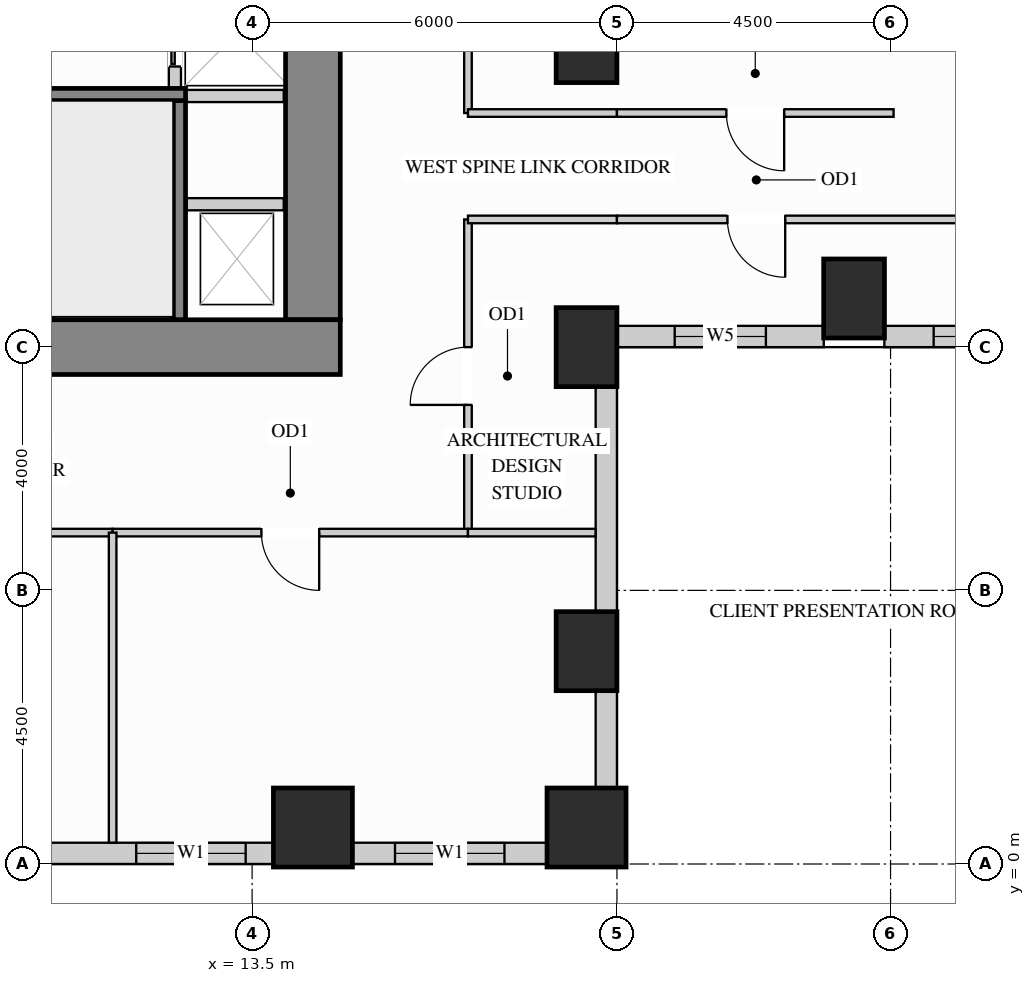
"""IFC4 building model, lengths in metres.
Left out: names, types, materials, properties, quantities, classifications, styles, units other than length and angle.
Written with IfcOpenShell. Run it as: python <this file> out.ifc"""

import sys

from ifc_helpers import new_model, si_unit, direction, frame, frame_2d, origin, origin_2d, place, context, subcontext, project, spatial, rectangle, extrude, source, transform, mapped, element, fill, save


model = new_model("IFC4")
c1 = context("Model", 3, precision=1e-05, world=origin(), true_north=direction((0.0, 1.0)))
c2 = subcontext(c1, "Body", "Model", "MODEL_VIEW")
j1 = project(units=[si_unit("LENGTHUNIT", "METRE"), si_unit("PLANEANGLEUNIT", "RADIAN")], contexts=[c1])
p1 = place(None, origin())
s1 = spatial("IfcSite", under=j1, at=p1, CompositionType="ELEMENT")
p2 = place(p1, origin())
s2 = spatial("IfcBuilding", under=s1, at=p2, CompositionType="ELEMENT")
p3 = place(p2, frame((0.0, 0.0, 26.1)))
s3 = spatial("IfcBuildingStorey", under=s2, at=p3, CompositionType="ELEMENT", Elevation=26.1)
m1 = source(origin(), c2, "Body", "SweptSolid", [
    extrude(rectangle(XDim=1.0, YDim=1.3, at=origin_2d()), origin(), (0.0, 0.0, 1.0), 3.38),
])
for number, where, z_axis, x_axis in (
    (1, (19.0, 13.5, 0.0), (0.0, 0.0, 1.0), (1.0, 0.0, 0.0)),
    (2, (19.0, 3.5, 0.0), (0.0, 0.0, 1.0), (1.0, 0.0, 0.0)),
    (3, (19.0, 8.5, 0.0), (0.0, 0.0, 1.0), (1.0, 0.0, 0.0)),
    (4, (23.4, 9.3, 0.0), (0.0, 0.0, 1.0), (1.0, 0.0, 0.0)),
):
    element("IfcColumn", number, at=place(p3, frame(where, z_axis=z_axis, x_axis=x_axis)), inside=s3, PredefinedType="COLUMN", context=c2, shape_type="MappedRepresentation", body=[
        mapped(m1, transform((0.0, 0.0, 0.0), x_axis=(1.0, 0.0, 0.0), y_axis=(0.0, 1.0, 0.0), z_axis=(0.0, 0.0, 1.0))),
    ])
m2 = source(origin(), c2, "Body", "SweptSolid", [
    extrude(rectangle(XDim=1.3, YDim=1.3, at=origin_2d()), origin(), (0.0, 0.0, 1.0), 3.38),
])
for number, where, z_axis, x_axis in (
    (5, (14.5, 0.6, 0.0), (0.0, 0.0, 1.0), (1.0, 0.0, 0.0)),
    (6, (19.0, 0.6, 0.0), (0.0, 0.0, 1.0), (1.0, 0.0, 0.0)),
):
    element("IfcColumn", number, at=place(p3, frame(where, z_axis=z_axis, x_axis=x_axis)), inside=s3, PredefinedType="COLUMN", context=c2, shape_type="MappedRepresentation", body=[
        mapped(m2, transform((0.0, 0.0, 0.0), x_axis=(1.0, 0.0, 0.0), y_axis=(0.0, 1.0, 0.0), z_axis=(0.0, 0.0, 1.0))),
    ])
m3 = source(origin(), c2, "Body", "SweptSolid", [
    extrude(rectangle(XDim=9.87, YDim=0.9, at=frame_2d((4.935, 0.0))), origin(), (0.0, 0.0, 1.0), 3.38),
])
p4 = place(p3, frame((14.5, 8.95, 0.0), z_axis=(0.0, 0.0, 1.0), x_axis=(0.0, 1.0, 0.0)))
e7 = element("IfcWall", 7, at=p4, inside=s3, PredefinedType="SHEAR", context=c2, shape_type="MappedRepresentation", body=[
    mapped(m3, transform((0.0, 0.0, 0.0), x_axis=(1.0, 0.0, 0.0), y_axis=(0.0, 1.0, 0.0), z_axis=(0.0, 0.0, 1.0))),
])
m4 = source(origin(), c2, "Body", "SweptSolid", [
    extrude(rectangle(XDim=10.9, YDim=0.9, at=frame_2d((5.45, 0.0))), origin(), (0.0, 0.0, 1.0), 3.38),
])
p5 = place(p3, frame((4.05, 8.5, 0.0), z_axis=(0.0, 0.0, 1.0), x_axis=(1.0, 0.0, 0.0)))
e8 = element("IfcWall", 8, at=p5, inside=s3, PredefinedType="SHEAR", context=c2, shape_type="MappedRepresentation", body=[
    mapped(m4, transform((0.0, 0.0, 0.0), x_axis=(1.0, 0.0, 0.0), y_axis=(0.0, 1.0, 0.0), z_axis=(0.0, 0.0, 1.0))),
])
p6 = place(p3, frame((9.648, 0.175, 0.0), z_axis=(0.0, 0.0, 1.0), x_axis=(1.0, 0.0, 0.0)))
e9 = element("IfcWall", 9, at=p6, inside=s3, PredefinedType="SOLIDWALL", context=c2, shape_type="SweptSolid", body=[
    extrude(rectangle(XDim=4.204, YDim=0.35, at=frame_2d((2.102, 0.0))), origin(), (0.0, 0.0, 1.0), 2.51),
])
p7 = place(p6, frame((1.946, 0.0, 0.78)))
e10 = element("IfcOpeningElement", 10, at=p7, cuts=e9, PredefinedType="OPENING", context=c2, shape_type="SweptSolid", body=[
    extrude(rectangle(XDim=1.8, YDim=1.55, at=frame_2d((0.9, 0.775))), frame((0.0, 0.185, 0.0), z_axis=(0.0, -1.0, 0.0), x_axis=(1.0, 0.0, 0.0)), (0.0, 0.0, 1.0), 0.37),
])
p8 = place(p3, frame((15.148, 0.175, 0.0), z_axis=(0.0, 0.0, 1.0), x_axis=(1.0, 0.0, 0.0)))
e11 = element("IfcWall", 11, at=p8, inside=s3, PredefinedType="SOLIDWALL", context=c2, shape_type="SweptSolid", body=[
    extrude(rectangle(XDim=3.204, YDim=0.35, at=frame_2d((1.602, 0.0))), origin(), (0.0, 0.0, 1.0), 2.51),
])
p9 = place(p8, frame((0.702, 0.0, 0.78)))
e12 = element("IfcOpeningElement", 12, at=p9, cuts=e11, PredefinedType="OPENING", context=c2, shape_type="SweptSolid", body=[
    extrude(rectangle(XDim=1.8, YDim=1.55, at=frame_2d((0.9, 0.775))), frame((0.0, 0.185, 0.0), z_axis=(0.0, -1.0, 0.0), x_axis=(1.0, 0.0, 0.0)), (0.0, 0.0, 1.0), 0.37),
])
m5 = source(origin(), c2, "Body", "SweptSolid", [
    extrude(rectangle(XDim=1.604, YDim=0.35, at=frame_2d((0.802, 0.0))), origin(), (0.0, 0.0, 1.0), 2.51),
])
p10 = place(p3, frame((19.325, 1.248, 0.0), z_axis=(0.0, 0.0, 1.0), x_axis=(0.0, 1.0, 0.0)))
e13 = element("IfcWall", 13, at=p10, inside=s3, PredefinedType="SOLIDWALL", context=c2, shape_type="MappedRepresentation", body=[
    mapped(m5, transform((0.0, 0.0, 0.0), x_axis=(1.0, 0.0, 0.0), y_axis=(0.0, 1.0, 0.0), z_axis=(0.0, 0.0, 1.0))),
])
m6 = source(origin(), c2, "Body", "SweptSolid", [
    extrude(rectangle(XDim=3.704, YDim=0.35, at=frame_2d((1.852, 0.0))), origin(), (0.0, 0.0, 1.0), 2.51),
])
p11 = place(p3, frame((19.325, 4.148, 0.0), z_axis=(0.0, 0.0, 1.0), x_axis=(0.0, 1.0, 0.0)))
e14 = element("IfcWall", 14, at=p11, inside=s3, PredefinedType="SOLIDWALL", context=c2, shape_type="MappedRepresentation", body=[
    mapped(m6, transform((0.0, 0.0, 0.0), x_axis=(1.0, 0.0, 0.0), y_axis=(0.0, 1.0, 0.0), z_axis=(0.0, 0.0, 1.0))),
])
p12 = place(p3, frame((19.498, 8.675, 0.0), z_axis=(0.0, 0.0, 1.0), x_axis=(1.0, 0.0, 0.0)))
e15 = element("IfcWall", 15, at=p12, inside=s3, PredefinedType="SOLIDWALL", context=c2, shape_type="SweptSolid", body=[
    extrude(rectangle(XDim=3.404, YDim=0.35, at=frame_2d((1.702, 0.0))), origin(), (0.0, 0.0, 1.0), 3.365),
])
p13 = place(p12, frame((0.952, 0.0, 0.78)))
e16 = element("IfcOpeningElement", 16, at=p13, cuts=e15, PredefinedType="OPENING", context=c2, shape_type="SweptSolid", body=[
    extrude(rectangle(XDim=1.5, YDim=2.0, at=frame_2d((0.75, 1.0))), frame((0.0, 0.185, 0.0), z_axis=(0.0, -1.0, 0.0), x_axis=(1.0, 0.0, 0.0)), (0.0, 0.0, 1.0), 0.37),
])
p14 = place(p3, frame((23.898, 8.675, 0.0), z_axis=(0.0, 0.0, 1.0), x_axis=(1.0, 0.0, 0.0)))
e17 = element("IfcWall", 17, at=p14, inside=s3, PredefinedType="SOLIDWALL", context=c2, shape_type="SweptSolid", body=[
    extrude(rectangle(XDim=6.104, YDim=0.35, at=frame_2d((3.052, 0.0))), origin(), (0.0, 0.0, 1.0), 3.365),
])
p15 = place(p14, frame((0.811, 0.0, 0.78)))
e18 = element("IfcOpeningElement", 18, at=p15, cuts=e17, PredefinedType="OPENING", context=c2, shape_type="SweptSolid", body=[
    extrude(rectangle(XDim=1.5, YDim=2.0, at=frame_2d((0.75, 1.0))), frame((0.0, 0.185, 0.0), z_axis=(0.0, -1.0, 0.0), x_axis=(1.0, 0.0, 0.0)), (0.0, 0.0, 1.0), 0.37),
])
p16 = place(p14, frame((3.793, 0.0, 0.78)))
e19 = element("IfcOpeningElement", 19, at=p16, cuts=e17, PredefinedType="OPENING", context=c2, shape_type="SweptSolid", body=[
    extrude(rectangle(XDim=1.5, YDim=2.0, at=frame_2d((0.75, 1.0))), frame((0.0, 0.185, 0.0), z_axis=(0.0, -1.0, 0.0), x_axis=(1.0, 0.0, 0.0)), (0.0, 0.0, 1.0), 0.37),
])
p17 = place(p3, frame((17.05, 12.35, 0.0), z_axis=(0.0, 0.0, 1.0), x_axis=(0.0, 1.0, 0.0)))
e20 = element("IfcWall", 20, at=p17, inside=s3, PredefinedType="PARTITIONING", context=c2, shape_type="SweptSolid", body=[
    extrude(rectangle(XDim=5.85, YDim=0.125, at=frame_2d((2.925, 0.0))), origin(), (0.0, 0.0, 1.0), 3.365),
])
p18 = place(p17, frame((2.45, 0.0, 0.0)))
e21 = element("IfcOpeningElement", 21, at=p18, cuts=e20, PredefinedType="OPENING", context=c2, shape_type="SweptSolid", body=[
    extrude(rectangle(XDim=0.95, YDim=2.15, at=frame_2d((0.475, 1.075))), frame((0.0, 0.073, 0.0), z_axis=(0.0, -1.0, 0.0), x_axis=(1.0, 0.0, 0.0)), (0.0, 0.0, 1.0), 0.145),
])
p19 = place(p3, frame((17.05, 5.45, 0.0), z_axis=(0.0, 0.0, 1.0), x_axis=(0.0, 1.0, 0.0)))
e22 = element("IfcWall", 22, at=p19, inside=s3, PredefinedType="PARTITIONING", context=c2, shape_type="SweptSolid", body=[
    extrude(rectangle(XDim=5.15, YDim=0.125, at=frame_2d((2.575, 0.0))), origin(), (0.0, 0.0, 1.0), 3.365),
])
p20 = place(p19, frame((2.1, 0.0, 0.0)))
e23 = element("IfcOpeningElement", 23, at=p20, cuts=e22, PredefinedType="OPENING", context=c2, shape_type="SweptSolid", body=[
    extrude(rectangle(XDim=0.95, YDim=2.15, at=frame_2d((0.475, 1.075))), frame((0.0, 0.073, 0.0), z_axis=(0.0, -1.0, 0.0), x_axis=(1.0, 0.0, 0.0)), (0.0, 0.0, 1.0), 0.145),
])
m7 = source(origin(), c2, "Body", "SweptSolid", [
    extrude(rectangle(XDim=2.45, YDim=0.125, at=frame_2d((1.225, 0.0))), origin(), (0.0, 0.0, 1.0), 3.365),
])
p21 = place(p3, frame((17.05, 12.35, 0.0), z_axis=(0.0, 0.0, 1.0), x_axis=(1.0, 0.0, 0.0)))
e24 = element("IfcWall", 24, at=p21, inside=s3, PredefinedType="PARTITIONING", context=c2, shape_type="MappedRepresentation", body=[
    mapped(m7, transform((0.0, 0.0, 0.0), x_axis=(1.0, 0.0, 0.0), y_axis=(0.0, 1.0, 0.0), z_axis=(0.0, 0.0, 1.0))),
])
p22 = place(p3, frame((19.5, 12.35, 0.0), z_axis=(0.0, 0.0, 1.0), x_axis=(1.0, 0.0, 0.0)))
e25 = element("IfcWall", 25, at=p22, inside=s3, PredefinedType="PARTITIONING", context=c2, shape_type="SweptSolid", body=[
    extrude(rectangle(XDim=4.55, YDim=0.125, at=frame_2d((2.275, 0.0))), origin(), (0.0, 0.0, 1.0), 3.365),
])
p23 = place(p22, frame((1.8, 0.0, 0.0)))
e26 = element("IfcOpeningElement", 26, at=p23, cuts=e25, PredefinedType="OPENING", context=c2, shape_type="SweptSolid", body=[
    extrude(rectangle(XDim=0.95, YDim=2.15, at=frame_2d((0.475, 1.075))), frame((0.0, 0.073, 0.0), z_axis=(0.0, -1.0, 0.0), x_axis=(1.0, 0.0, 0.0)), (0.0, 0.0, 1.0), 0.145),
])
p24 = place(p3, frame((17.05, 10.6, 0.0), z_axis=(0.0, 0.0, 1.0), x_axis=(1.0, 0.0, 0.0)))
e27 = element("IfcWall", 27, at=p24, inside=s3, PredefinedType="PARTITIONING", context=c2, shape_type="MappedRepresentation", body=[
    mapped(m7, transform((0.0, 0.0, 0.0), x_axis=(1.0, 0.0, 0.0), y_axis=(0.0, 1.0, 0.0), z_axis=(0.0, 0.0, 1.0))),
])
p25 = place(p3, frame((19.5, 10.6, 0.0), z_axis=(0.0, 0.0, 1.0), x_axis=(1.0, 0.0, 0.0)))
e28 = element("IfcWall", 28, at=p25, inside=s3, PredefinedType="PARTITIONING", context=c2, shape_type="SweptSolid", body=[
    extrude(rectangle(XDim=7.45, YDim=0.125, at=frame_2d((3.725, 0.0))), origin(), (0.0, 0.0, 1.0), 3.365),
])
p26 = place(p25, frame((1.817, 0.0, 0.0)))
e29 = element("IfcOpeningElement", 29, at=p26, cuts=e28, PredefinedType="OPENING", context=c2, shape_type="SweptSolid", body=[
    extrude(rectangle(XDim=0.95, YDim=2.15, at=frame_2d((0.475, 1.075))), frame((0.0, 0.073, 0.0), z_axis=(0.0, -1.0, 0.0), x_axis=(1.0, 0.0, 0.0)), (0.0, 0.0, 1.0), 0.145),
])
p27 = place(p3, frame((2.45, 5.45, 0.0), z_axis=(0.0, 0.0, 1.0), x_axis=(1.0, 0.0, 0.0)))
e30 = element("IfcWall", 30, at=p27, inside=s3, PredefinedType="PARTITIONING", context=c2, shape_type="SweptSolid", body=[
    extrude(rectangle(XDim=8.756, YDim=0.125, at=frame_2d((4.378, 0.0))), origin(), (0.0, 0.0, 1.0), 3.365),
])
p28 = place(p27, frame((3.903, 0.0, 0.0)))
e31 = element("IfcOpeningElement", 31, at=p28, cuts=e30, PredefinedType="OPENING", context=c2, shape_type="SweptSolid", body=[
    extrude(rectangle(XDim=0.95, YDim=2.15, at=frame_2d((0.475, 1.075))), frame((0.0, 0.073, 0.0), z_axis=(0.0, -1.0, 0.0), x_axis=(1.0, 0.0, 0.0)), (0.0, 0.0, 1.0), 0.145),
])
p29 = place(p3, frame((11.206, 5.45, 0.0), z_axis=(0.0, 0.0, 1.0), x_axis=(1.0, 0.0, 0.0)))
e32 = element("IfcWall", 32, at=p29, inside=s3, PredefinedType="PARTITIONING", context=c2, shape_type="SweptSolid", body=[
    extrude(rectangle(XDim=5.844, YDim=0.125, at=frame_2d((2.922, 0.0))), origin(), (0.0, 0.0, 1.0), 3.365),
])
p30 = place(p29, frame((2.447, 0.0, 0.0)))
e33 = element("IfcOpeningElement", 33, at=p30, cuts=e32, PredefinedType="OPENING", context=c2, shape_type="SweptSolid", body=[
    extrude(rectangle(XDim=0.95, YDim=2.15, at=frame_2d((0.475, 1.075))), frame((0.0, 0.073, 0.0), z_axis=(0.0, -1.0, 0.0), x_axis=(1.0, 0.0, 0.0)), (0.0, 0.0, 1.0), 0.145),
])
m8 = source(origin(), c2, "Body", "SweptSolid", [
    extrude(rectangle(XDim=2.098, YDim=0.125, at=frame_2d((1.049, 0.0))), origin(), (0.0, 0.0, 1.0), 3.365),
])
p31 = place(p3, frame((17.05, 5.45, 0.0), z_axis=(0.0, 0.0, 1.0), x_axis=(1.0, 0.0, 0.0)))
e34 = element("IfcWall", 34, at=p31, inside=s3, PredefinedType="PARTITIONING", context=c2, shape_type="MappedRepresentation", body=[
    mapped(m8, transform((0.0, 0.0, 0.0), x_axis=(1.0, 0.0, 0.0), y_axis=(0.0, 1.0, 0.0), z_axis=(0.0, 0.0, 1.0))),
])
m9 = source(origin(), c2, "Body", "SweptSolid", [
    extrude(rectangle(XDim=5.098, YDim=0.125, at=frame_2d((2.549, 0.0))), origin(), (0.0, 0.0, 1.0), 3.365),
])
p32 = place(p3, frame((11.206, 0.352, 0.0), z_axis=(0.0, 0.0, 1.0), x_axis=(0.0, 1.0, 0.0)))
e35 = element("IfcWall", 35, at=p32, inside=s3, PredefinedType="PARTITIONING", context=c2, shape_type="MappedRepresentation", body=[
    mapped(m9, transform((0.0, 0.0, 0.0), x_axis=(1.0, 0.0, 0.0), y_axis=(0.0, 1.0, 0.0), z_axis=(0.0, 0.0, 1.0))),
])
m10 = source(origin(), c2, "Body", "SweptSolid", [
    extrude(rectangle(XDim=1.6, YDim=0.2, at=frame_2d((0.8, 0.0))), origin(), (0.0, 0.0, 1.0), 3.365),
])
p33 = place(p3, frame((12.42, 10.85, 0.0), z_axis=(0.0, 0.0, 1.0), x_axis=(1.0, 0.0, 0.0)))
e36 = element("IfcWall", 36, at=p33, inside=s3, PredefinedType="PARTITIONING", context=c2, shape_type="MappedRepresentation", body=[
    mapped(m10, transform((0.0, 0.0, 0.0), x_axis=(1.0, 0.0, 0.0), y_axis=(0.0, 1.0, 0.0), z_axis=(0.0, 0.0, 1.0))),
])
m11 = source(origin(), c2, "Body", "SweptSolid", [
    extrude(rectangle(XDim=1.79, YDim=0.2, at=frame_2d((0.895, 0.0))), origin(), (0.0, 0.0, 1.0), 3.365),
])
p34 = place(p3, frame((12.23, 12.63, 0.0), z_axis=(0.0, 0.0, 1.0), x_axis=(1.0, 0.0, 0.0)))
e37 = element("IfcWall", 37, at=p34, inside=s3, PredefinedType="PARTITIONING", context=c2, shape_type="MappedRepresentation", body=[
    mapped(m11, transform((0.0, 0.0, 0.0), x_axis=(1.0, 0.0, 0.0), y_axis=(0.0, 1.0, 0.0), z_axis=(0.0, 0.0, 1.0))),
])
p35 = place(p3, frame((12.23, 12.63, 0.0), z_axis=(0.0, 0.0, 1.0), x_axis=(0.0, 1.0, 0.0)))
e38 = element("IfcWall", 38, at=p35, inside=s3, PredefinedType="PARTITIONING", context=c2, shape_type="SweptSolid", body=[
    extrude(rectangle(XDim=2.07, YDim=0.2, at=frame_2d((1.035, 0.0))), origin(), (0.0, 0.0, 1.0), 3.365),
])
p36 = place(p35, frame((0.485, 0.0, 0.0)))
e39 = element("IfcOpeningElement", 39, at=p36, cuts=e38, PredefinedType="OPENING", context=c2, shape_type="SweptSolid", body=[
    extrude(rectangle(XDim=1.1, YDim=2.2, at=frame_2d((0.55, 1.1))), frame((0.0, 0.11, 0.0), z_axis=(0.0, -1.0, 0.0), x_axis=(1.0, 0.0, 0.0)), (0.0, 0.0, 1.0), 0.22),
])
m12 = source(origin(), c2, "Body", "SweptSolid", [
    extrude(rectangle(XDim=3.603, YDim=0.2, at=frame_2d((1.802, 0.0))), origin(), (0.0, 0.0, 1.0), 3.38),
])
p37 = place(p3, frame((12.305, 8.952, 0.0), z_axis=(0.0, 0.0, 1.0), x_axis=(0.0, 1.0, 0.0)))
e40 = element("IfcWall", 40, at=p37, inside=s3, PredefinedType="SHEAR", context=c2, shape_type="MappedRepresentation", body=[
    mapped(m12, transform((0.0, 0.0, 0.0), x_axis=(1.0, 0.0, 0.0), y_axis=(0.0, 1.0, 0.0), z_axis=(0.0, 0.0, 1.0))),
])
p38 = place(p3, frame((4.952, 12.655, 0.0), z_axis=(0.0, 0.0, 1.0), x_axis=(1.0, 0.0, 0.0)))
e41 = element("IfcWall", 41, at=p38, inside=s3, PredefinedType="SHEAR", context=c2, shape_type="SweptSolid", body=[
    extrude(rectangle(XDim=7.453, YDim=0.2, at=frame_2d((3.727, 0.0))), origin(), (0.0, 0.0, 1.0), 3.38),
])
p39 = place(p38, frame((0.4, 0.0, 0.0)))
e42 = element("IfcOpeningElement", 42, at=p39, cuts=e41, PredefinedType="OPENING", context=c2, shape_type="SweptSolid", body=[
    extrude(rectangle(XDim=1.1, YDim=2.15, at=frame_2d((0.55, 1.075))), frame((0.0, 0.11, 0.0), z_axis=(0.0, -1.0, 0.0), x_axis=(1.0, 0.0, 0.0)), (0.0, 0.0, 1.0), 0.22),
])
m13 = source(origin(), c2, "Body", "SweptSolid", [
    extrude(rectangle(XDim=1.1, YDim=2.2, at=frame_2d((0.55, 1.1))), frame((0.0, 0.025, 0.0), z_axis=(0.0, -1.0, 0.0), x_axis=(1.0, 0.0, 0.0)), (0.0, 0.0, 1.0), 0.05),
])
p40 = place(p36, origin())
e43 = element("IfcDoor", 43, at=p40, inside=s3, OperationType="SLIDING_TO_LEFT", PredefinedType="DOOR", context=c2, shape_type="MappedRepresentation", body=[
    mapped(m13, transform((0.0, 0.0, 0.0), x_axis=(1.0, 0.0, 0.0), y_axis=(0.0, 1.0, 0.0), z_axis=(0.0, 0.0, 1.0))),
])
fill(e39, e43)
m14 = source(origin(), c2, "Body", "SweptSolid", [
    extrude(rectangle(XDim=0.95, YDim=2.15, at=frame_2d((0.475, 1.075))), frame((0.0, 0.025, 0.0), z_axis=(0.0, -1.0, 0.0), x_axis=(1.0, 0.0, 0.0)), (0.0, 0.0, 1.0), 0.05),
])
p41 = place(p20, origin())
e44 = element("IfcDoor", 44, at=p41, inside=s3, OperationType="SINGLE_SWING_LEFT", PredefinedType="DOOR", context=c2, shape_type="MappedRepresentation", body=[
    mapped(m14, transform((0.0, 0.0, 0.0), x_axis=(1.0, 0.0, 0.0), y_axis=(0.0, 1.0, 0.0), z_axis=(0.0, 0.0, 1.0))),
])
fill(e23, e44)
p42 = place(p30, origin())
e45 = element("IfcDoor", 45, at=p42, inside=s3, OperationType="SINGLE_SWING_RIGHT", PredefinedType="DOOR", context=c2, shape_type="MappedRepresentation", body=[
    mapped(m14, transform((0.0, 0.0, 0.0), x_axis=(1.0, 0.0, 0.0), y_axis=(0.0, 1.0, 0.0), z_axis=(0.0, 0.0, 1.0))),
])
fill(e33, e45)
p43 = place(p23, origin())
e46 = element("IfcDoor", 46, at=p43, inside=s3, OperationType="SINGLE_SWING_RIGHT", PredefinedType="DOOR", context=c2, shape_type="MappedRepresentation", body=[
    mapped(m14, transform((0.0, 0.0, 0.0), x_axis=(1.0, 0.0, 0.0), y_axis=(0.0, 1.0, 0.0), z_axis=(0.0, 0.0, 1.0))),
])
fill(e26, e46)
p44 = place(p26, origin())
e47 = element("IfcDoor", 47, at=p44, inside=s3, OperationType="SINGLE_SWING_RIGHT", PredefinedType="DOOR", context=c2, shape_type="MappedRepresentation", body=[
    mapped(m14, transform((0.0, 0.0, 0.0), x_axis=(1.0, 0.0, 0.0), y_axis=(0.0, 1.0, 0.0), z_axis=(0.0, 0.0, 1.0))),
])
fill(e29, e47)
m15 = source(origin(), c2, "Body", "SweptSolid", [
    extrude(rectangle(XDim=1.8, YDim=1.55, at=frame_2d((0.9, 0.775))), frame((0.0, 0.03, 0.0), z_axis=(0.0, -1.0, 0.0), x_axis=(1.0, 0.0, 0.0)), (0.0, 0.0, 1.0), 0.06),
])
p45 = place(p7, origin())
e48 = element("IfcWindow", 48, at=p45, inside=s3, PartitioningType="SINGLE_PANEL", PredefinedType="WINDOW", context=c2, shape_type="MappedRepresentation", body=[
    mapped(m15, transform((0.0, 0.0, 0.0), x_axis=(1.0, 0.0, 0.0), y_axis=(0.0, 1.0, 0.0), z_axis=(0.0, 0.0, 1.0))),
])
fill(e10, e48)
p46 = place(p9, origin())
e49 = element("IfcWindow", 49, at=p46, inside=s3, PartitioningType="SINGLE_PANEL", PredefinedType="WINDOW", context=c2, shape_type="MappedRepresentation", body=[
    mapped(m15, transform((0.0, 0.0, 0.0), x_axis=(1.0, 0.0, 0.0), y_axis=(0.0, 1.0, 0.0), z_axis=(0.0, 0.0, 1.0))),
])
fill(e12, e49)
m16 = source(origin(), c2, "Body", "SweptSolid", [
    extrude(rectangle(XDim=1.5, YDim=2.0, at=frame_2d((0.75, 1.0))), frame((0.0, 0.03, 0.0), z_axis=(0.0, -1.0, 0.0), x_axis=(1.0, 0.0, 0.0)), (0.0, 0.0, 1.0), 0.06),
])
p47 = place(p13, origin())
e50 = element("IfcWindow", 50, at=p47, inside=s3, PartitioningType="SINGLE_PANEL", PredefinedType="WINDOW", context=c2, shape_type="MappedRepresentation", body=[
    mapped(m16, transform((0.0, 0.0, 0.0), x_axis=(1.0, 0.0, 0.0), y_axis=(0.0, 1.0, 0.0), z_axis=(0.0, 0.0, 1.0))),
])
fill(e16, e50)
p48 = place(p15, origin())
e51 = element("IfcWindow", 51, at=p48, inside=s3, PartitioningType="SINGLE_PANEL", PredefinedType="WINDOW", context=c2, shape_type="MappedRepresentation", body=[
    mapped(m16, transform((0.0, 0.0, 0.0), x_axis=(1.0, 0.0, 0.0), y_axis=(0.0, 1.0, 0.0), z_axis=(0.0, 0.0, 1.0))),
])
fill(e18, e51)
save(model, sys.argv[1])
